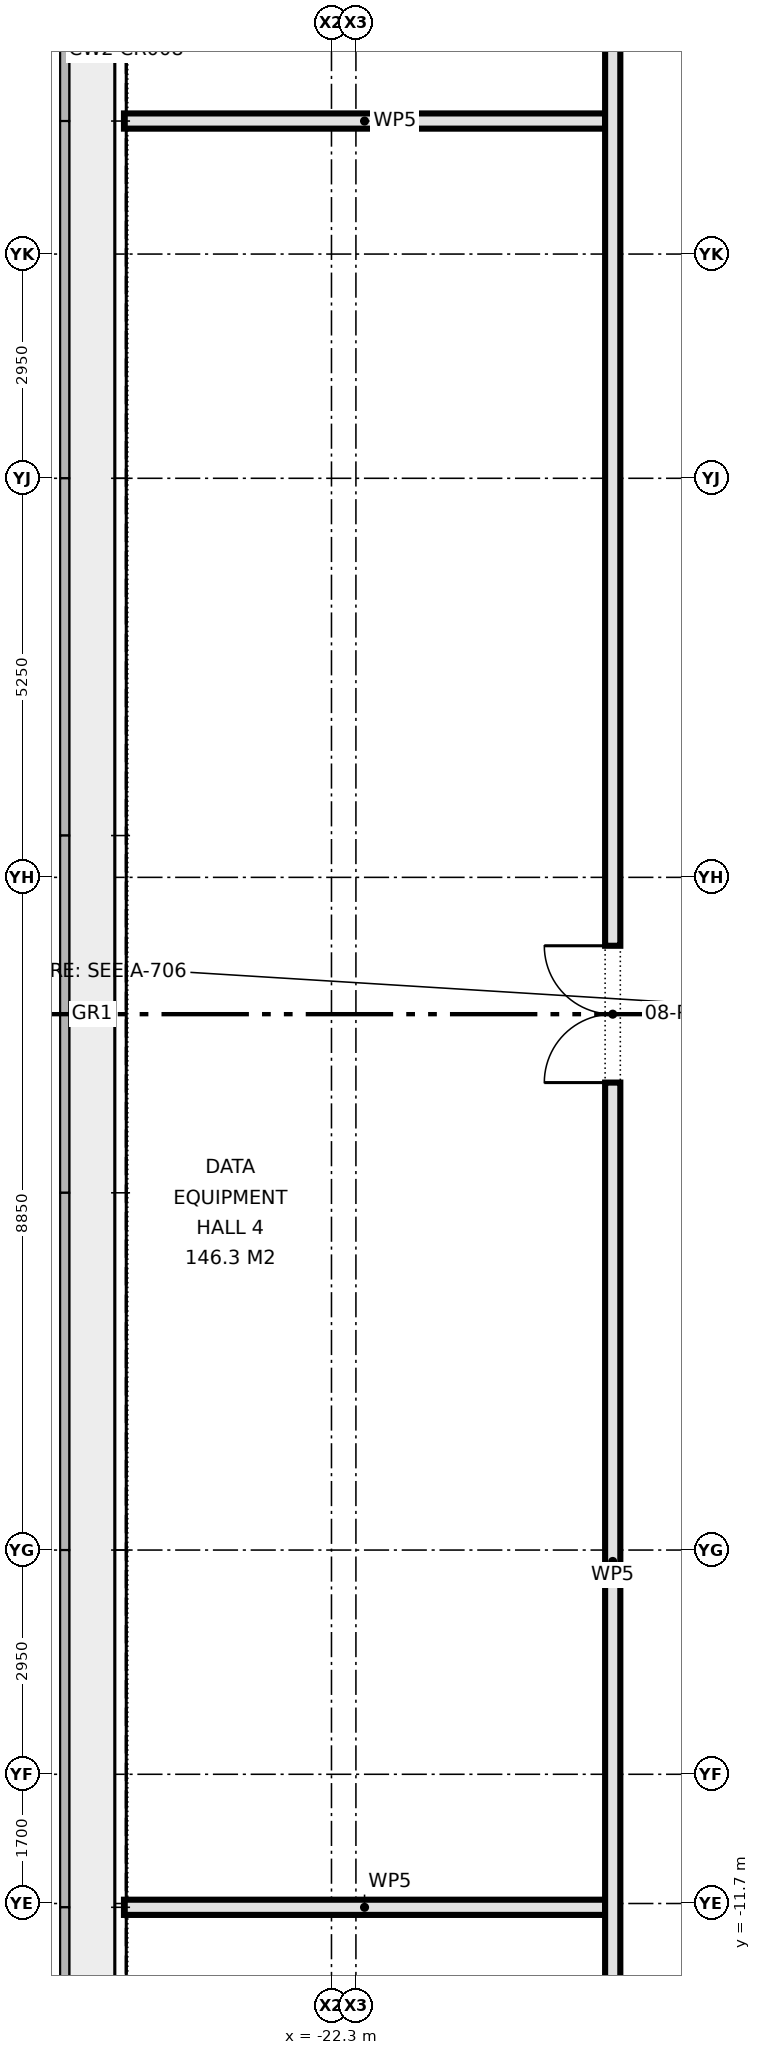
"""IFC4 building model, lengths in metres.
Left out: names, types, materials, properties, quantities, classifications, styles, units other than length and angle.
Written with IfcOpenShell. Run it as: python <this file> out.ifc"""

import sys

from ifc_helpers import new_model, si_unit, direction, frame, frame_2d, origin, place, context, subcontext, project, spatial, rectangle, extrude, element, fill, save


model = new_model("IFC4")
c1 = context("Model", 3, precision=1e-05, world=origin(), true_north=direction((0.0, 1.0)))
c2 = subcontext(c1, "Body", "Model", "MODEL_VIEW")
j1 = project(units=[si_unit("LENGTHUNIT", "METRE"), si_unit("PLANEANGLEUNIT", "RADIAN")], contexts=[c1])
p1 = place(None, origin())
s1 = spatial("IfcSite", under=j1, at=p1, CompositionType="ELEMENT")
p2 = place(p1, origin())
s2 = spatial("IfcBuilding", under=s1, at=p2, CompositionType="ELEMENT")
p3 = place(p2, frame((0.0, 0.0, 35.3)))
s3 = spatial("IfcBuildingStorey", under=s2, at=p3, CompositionType="ELEMENT", Elevation=35.3)
for number, where, z_axis, x_axis in (
    (1, (-25.03, -11.75, 0.0), (0.0, 0.0, 1.0), (1.0, 0.0, 0.0)),
    (2, (-25.03, 11.75, 0.0), (0.0, 0.0, 1.0), (1.0, 0.0, 0.0)),
):
    element("IfcWall", number, at=place(p3, frame(where, z_axis=z_axis, x_axis=x_axis)), inside=s3, PredefinedType="PARTITIONING", context=c2, shape_type="SweptSolid", body=[
        extrude(rectangle(XDim=6.33, YDim=0.2, at=frame_2d((3.165, 0.0))), origin(), (0.0, 0.0, 1.0), 4.575),
    ])
p4 = place(p3, frame((-18.6, -13.5, 0.0), z_axis=(0.0, 0.0, 1.0), x_axis=(0.0, 1.0, 0.0)))
e3 = element("IfcWall", 3, at=p4, inside=s3, PredefinedType="PARTITIONING", context=c2, shape_type="SweptSolid", body=[
    extrude(rectangle(XDim=27.0, YDim=0.2, at=frame_2d((13.5, 0.0))), origin(), (0.0, 0.0, 1.0), 4.575),
])
p5 = place(p4, frame((12.6, 0.0, 0.0)))
e4 = element("IfcOpeningElement", 4, at=p5, cuts=e3, PredefinedType="OPENING", context=c2, shape_type="SweptSolid", body=[
    extrude(rectangle(XDim=1.8, YDim=2.1, at=frame_2d((0.9, 1.05))), frame((0.0, 0.11, 0.0), z_axis=(0.0, -1.0, 0.0), x_axis=(1.0, 0.0, 0.0)), (0.0, 0.0, 1.0), 0.22),
])
p6 = place(p5, origin())
e5 = element("IfcDoor", 5, at=p6, inside=s3, OperationType="DOUBLE_DOOR_SINGLE_SWING", PredefinedType="DOOR", context=c2, shape_type="SweptSolid", body=[
    extrude(rectangle(XDim=1.8, YDim=2.1, at=frame_2d((0.9, 1.05))), frame((0.0, 0.025, 0.0), z_axis=(0.0, -1.0, 0.0), x_axis=(1.0, 0.0, 0.0)), (0.0, 0.0, 1.0), 0.05),
])
fill(e4, e5)
save(model, sys.argv[1])
